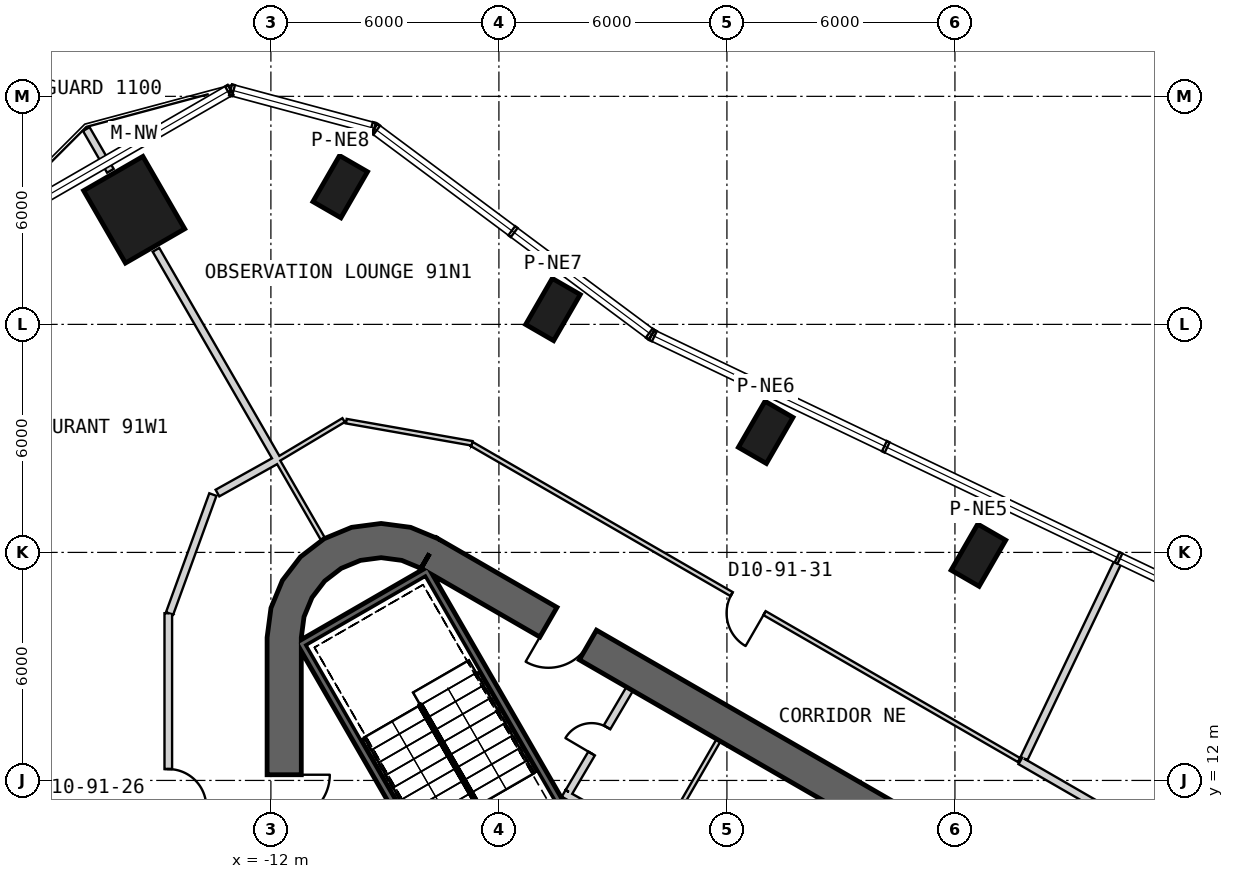
"""IFC4 building model, lengths in metres.
Left out: names, types, materials, properties, quantities, classifications, styles, units other than length and angle.
Written with IfcOpenShell. Run it as: python <this file> out.ifc"""

import sys

from ifc_helpers import new_model, si_unit, direction, frame, frame_2d, origin, origin_2d, place, context, subcontext, project, spatial, polyline, rectangle, outline, extrude, element, fill, save


model = new_model("IFC4")
c1 = context("Model", 3, precision=1e-05, world=origin(), true_north=direction((0.0, 1.0)))
c2 = subcontext(c1, "Body", "Model", "MODEL_VIEW")
j1 = project(units=[si_unit("LENGTHUNIT", "METRE"), si_unit("PLANEANGLEUNIT", "RADIAN")], contexts=[c1])
p1 = place(None, origin())
s1 = spatial("IfcSite", under=j1, at=p1, CompositionType="ELEMENT")
p2 = place(p1, origin())
s2 = spatial("IfcBuilding", under=s1, at=p2, CompositionType="ELEMENT")
p3 = place(p2, frame((0.0, 0.0, 398.3)))
s3 = spatial("IfcBuildingStorey", under=s2, at=p3, CompositionType="ELEMENT", Elevation=398.3)
p4 = place(p3, frame((-15.598, 27.016, 0.0), z_axis=(0.0, 0.0, 1.0), x_axis=(-0.5, 0.866025403784, 0.0)))
e1 = element("IfcColumn", 1, at=p4, inside=s3, PredefinedType="COLUMN", context=c2, shape_type="SweptSolid", body=[
    extrude(rectangle(XDim=2.2, YDim=1.8, at=origin_2d()), origin(), (0.0, 0.0, 1.0), 6.5),
])
for number, where, z_axis, x_axis in (
    (2, (6.618, 17.927, -0.3), (0.0, 0.0, 1.0), (0.5, 0.866, 0.0)),
    (3, (1.02, 21.159, -0.3), (0.0, 0.0, 1.0), (0.5, 0.866, 0.0)),
):
    element("IfcColumn", number, at=place(p3, frame(where, z_axis=z_axis, x_axis=x_axis)), inside=s3, PredefinedType="COLUMN", context=c2, shape_type="SweptSolid", body=[
        extrude(rectangle(XDim=1.4, YDim=0.85, at=origin_2d()), origin(), (0.0, 0.0, 1.0), 6.8),
    ])
for number, where, z_axis, x_axis in (
    (4, (-4.578, 24.391, 0.0), (0.0, 0.0, 1.0), (0.5, 0.866, 0.0)),
    (5, (-10.176, 27.623, 0.0), (0.0, 0.0, 1.0), (0.5, 0.866, 0.0)),
):
    element("IfcColumn", number, at=place(p3, frame(where, z_axis=z_axis, x_axis=x_axis)), inside=s3, PredefinedType="COLUMN", context=c2, shape_type="SweptSolid", body=[
        extrude(rectangle(XDim=1.4, YDim=0.85, at=origin_2d()), origin(), (0.0, 0.0, 1.0), 6.5),
    ])
p5 = place(p3, frame((19.475, 2.208, 0.0), z_axis=(0.0, 0.0, 1.0), x_axis=(-0.866028369851, 0.499994862586, 0.0)))
e6 = element("IfcWall", 6, at=p5, inside=s3, PredefinedType="SHEAR", context=c2, shape_type="SweptSolid", body=[
    extrude(rectangle(XDim=31.523, YDim=0.9, at=frame_2d((15.762, 0.0))), origin(), (0.0, 0.0, 1.0), 6.5),
])
p6 = place(p5, frame((3.612, 0.0, 0.0)))
e7 = element("IfcOpeningElement", 7, at=p6, cuts=e6, PredefinedType="OPENING", context=c2, shape_type="SweptSolid", body=[
    extrude(rectangle(XDim=1.2, YDim=2.4, at=frame_2d((0.6, 1.2))), frame((0.0, 0.46, 0.0), z_axis=(0.0, -1.0, 0.0), x_axis=(1.0, 0.0, 0.0)), (0.0, 0.0, 1.0), 0.92),
])
p7 = place(p5, frame((26.712, 0.0, 0.0)))
e8 = element("IfcOpeningElement", 8, at=p7, cuts=e6, PredefinedType="OPENING", context=c2, shape_type="SweptSolid", body=[
    extrude(rectangle(XDim=1.2, YDim=2.4, at=frame_2d((0.6, 1.2))), frame((0.0, 0.46, 0.0), z_axis=(0.0, -1.0, 0.0), x_axis=(1.0, 0.0, 0.0)), (0.0, 0.0, 1.0), 0.92),
])
p8 = place(p3, frame((-11.65, 15.762, 0.0), z_axis=(0.0, 0.0, 1.0), x_axis=(0.0, -1.0, 0.0)))
e9 = element("IfcWall", 9, at=p8, inside=s3, PredefinedType="SHEAR", context=c2, shape_type="SweptSolid", body=[
    extrude(rectangle(XDim=31.523, YDim=0.9, at=frame_2d((15.762, 0.0))), origin(), (0.0, 0.0, 1.0), 6.5),
])
p9 = place(p8, frame((3.612, 0.0, 0.0)))
e10 = element("IfcOpeningElement", 10, at=p9, cuts=e9, PredefinedType="OPENING", context=c2, shape_type="SweptSolid", body=[
    extrude(rectangle(XDim=1.2, YDim=2.4, at=frame_2d((0.6, 1.2))), frame((0.0, 0.46, 0.0), z_axis=(0.0, -1.0, 0.0), x_axis=(1.0, 0.0, 0.0)), (0.0, 0.0, 1.0), 0.92),
])
p10 = place(p8, frame((26.712, 0.0, 0.0)))
e11 = element("IfcOpeningElement", 11, at=p10, cuts=e9, PredefinedType="OPENING", context=c2, shape_type="SweptSolid", body=[
    extrude(rectangle(XDim=1.2, YDim=2.4, at=frame_2d((0.6, 1.2))), frame((0.0, 0.46, 0.0), z_axis=(0.0, -1.0, 0.0), x_axis=(1.0, 0.0, 0.0)), (0.0, 0.0, 1.0), 0.92),
])
p11 = place(p3, origin())
e12 = element("IfcWall", 12, at=p11, inside=s3, PredefinedType="SHEAR", context=c2, shape_type="SweptSolid", body=[
    extrude(outline(polyline([(-7.6, 18.36), (-8.323, 18.659), (-9.1, 18.762), (-9.876, 18.659), (-10.6, 18.36), (-11.221, 17.883), (-11.698, 17.262), (-11.998, 16.538), (-12.1, 15.762), (-11.2, 15.762), (-11.128, 16.305), (-10.919, 16.812), (-10.585, 17.247), (-10.15, 17.58), (-9.644, 17.79), (-9.1, 17.862), (-8.556, 17.79), (-8.05, 17.58), (-7.6, 18.36)])), origin(), (0.0, 0.0, 1.0), 6.5),
])
p12 = place(p3, frame((-11.245, 15.678, -0.3), z_axis=(0.0, 0.0, 1.0), x_axis=(0.499977274689, -0.866038523851, 0.0)))
e13 = element("IfcWall", 13, at=p12, inside=s3, PredefinedType="SHEAR", context=c2, shape_type="SweptSolid", body=[
    extrude(rectangle(XDim=8.1, YDim=0.2, at=frame_2d((4.05, 0.0))), origin(), (0.0, 0.0, 1.0), 6.5),
])
p13 = place(p3, frame((-7.818, 17.541, -0.3), z_axis=(0.0, 0.0, 1.0), x_axis=(-0.866044365799, -0.499967155389, 0.0)))
e14 = element("IfcWall", 14, at=p13, inside=s3, PredefinedType="SHEAR", context=c2, shape_type="SweptSolid", body=[
    extrude(rectangle(XDim=3.8, YDim=0.2, at=frame_2d((1.9, 0.0))), origin(), (0.0, 0.0, 1.0), 6.5),
])
p14 = place(p3, frame((-7.854, 17.405, -0.3), z_axis=(0.0, 0.0, 1.0), x_axis=(0.499997992926, -0.866026562566, 0.0)))
e15 = element("IfcWall", 15, at=p14, inside=s3, PredefinedType="SHEAR", context=c2, shape_type="SweptSolid", body=[
    extrude(rectangle(XDim=7.9, YDim=0.2, at=frame_2d((3.95, 0.0))), origin(), (0.0, 0.0, 1.0), 6.5),
])
p15 = place(p3, frame((-0.22, 13.06, 0.0), z_axis=(0.0, 0.0, 1.0), x_axis=(-0.499984717929, -0.866034226713, 0.0)))
e16 = element("IfcWall", 16, at=p15, inside=s3, PredefinedType="PARTITIONING", context=c2, shape_type="SweptSolid", body=[
    extrude(rectangle(XDim=3.25, YDim=0.12, at=frame_2d((1.625, 0.0))), origin(), (0.0, 0.0, 1.0), 6.2),
])
p16 = place(p3, frame((-4.296, 11.659, 0.0), z_axis=(0.0, 0.0, 1.0), x_axis=(0.871534483978, -0.490334215854, 0.0)))
e17 = element("IfcWall", 17, at=p16, inside=s3, PredefinedType="PARTITIONING", context=c2, shape_type="SweptSolid", body=[
    extrude(rectangle(XDim=2.7, YDim=0.2, at=frame_2d((1.35, 0.0))), origin(), (0.0, 0.0, 1.0), 6.2),
])
p17 = place(p3, frame((-2.558, 14.409, 0.0), z_axis=(0.0, 0.0, 1.0), x_axis=(-0.508018930956, -0.861345903683, 0.0)))
e18 = element("IfcWall", 18, at=p17, inside=s3, PredefinedType="PARTITIONING", context=c2, shape_type="SweptSolid", body=[
    extrude(rectangle(XDim=3.15, YDim=0.2, at=frame_2d((1.575, 0.0))), origin(), (0.0, 0.0, 1.0), 6.2),
])
p18 = place(p17, frame((1.175, 0.0, 0.0)))
e19 = element("IfcOpeningElement", 19, at=p18, cuts=e18, PredefinedType="OPENING", context=c2, shape_type="SweptSolid", body=[
    extrude(rectangle(XDim=0.8, YDim=2.1, at=frame_2d((0.4, 1.05))), frame((0.0, 0.11, 0.0), z_axis=(0.0, -1.0, 0.0), x_axis=(1.0, 0.0, 0.0)), (0.0, 0.0, 1.0), 0.22),
])
p19 = place(p3, frame((-14.7, 16.399, 0.0), z_axis=(0.0, 0.0, 1.0), x_axis=(0.0, -1.0, 0.0)))
e20 = element("IfcWall", 20, at=p19, inside=s3, PredefinedType="PARTITIONING", context=c2, shape_type="SweptSolid", body=[
    extrude(rectangle(XDim=9.078, YDim=0.2, at=frame_2d((4.539, 0.0))), origin(), (0.0, 0.0, 1.0), 5.57),
])
p20 = place(p19, frame((4.1, 0.0, 0.0)))
e21 = element("IfcOpeningElement", 21, at=p20, cuts=e20, PredefinedType="OPENING", context=c2, shape_type="SweptSolid", body=[
    extrude(rectangle(XDim=1.0, YDim=2.1, at=frame_2d((0.5, 1.05))), frame((0.0, 0.11, 0.0), z_axis=(0.0, -1.0, 0.0), x_axis=(1.0, 0.0, 0.0)), (0.0, 0.0, 1.0), 0.22),
])
p21 = place(p3, frame((-13.527, 19.522, 0.0), z_axis=(0.0, 0.0, 1.0), x_axis=(-0.341978542333, -0.939707761266, 0.0)))
e22 = element("IfcWall", 22, at=p21, inside=s3, PredefinedType="PARTITIONING", context=c2, shape_type="SweptSolid", body=[
    extrude(rectangle(XDim=3.33, YDim=0.2, at=frame_2d((1.665, 0.0))), origin(), (0.0, 0.0, 1.0), 5.57),
])
p22 = place(p3, frame((-11.808, 20.452, 0.0), z_axis=(0.0, 0.0, 1.0), x_axis=(-0.873514477635, -0.486798169021, 0.0)))
e23 = element("IfcWall", 23, at=p22, inside=s3, PredefinedType="PARTITIONING", context=c2, shape_type="SweptSolid", body=[
    extrude(rectangle(XDim=1.83, YDim=0.2, at=frame_2d((0.915, 0.0))), origin(), (0.0, 0.0, 1.0), 5.57),
])
p23 = place(p3, frame((-11.849, 20.463, 0.0), z_axis=(0.0, 0.0, 1.0), x_axis=(0.500047596559, -0.865997922154, 0.0)))
e24 = element("IfcWall", 24, at=p23, inside=s3, PredefinedType="PARTITIONING", context=c2, shape_type="SweptSolid", body=[
    extrude(rectangle(XDim=2.6, YDim=0.12, at=frame_2d((1.3, 0.0))), origin(), (0.0, 0.0, 1.0), 5.57),
])
p24 = place(p3, frame((-16.858, 29.138, 0.0), z_axis=(0.0, 0.0, 1.0), x_axis=(0.499950289094, -0.866054102487, 0.0)))
e25 = element("IfcWall", 25, at=p24, inside=s3, PredefinedType="PARTITIONING", context=c2, shape_type="SweptSolid", body=[
    extrude(rectangle(XDim=1.268, YDim=0.2, at=frame_2d((0.634, 0.0))), origin(), (0.0, 0.0, 1.0), 6.2),
])
p25 = place(p3, frame((-15.024, 25.962, 0.0), z_axis=(0.0, 0.0, 1.0), x_axis=(0.499993152284, -0.866029357279, 0.0)))
e26 = element("IfcWall", 26, at=p25, inside=s3, PredefinedType="PARTITIONING", context=c2, shape_type="SweptSolid", body=[
    extrude(rectangle(XDim=6.35, YDim=0.2, at=frame_2d((3.175, 0.0))), origin(), (0.0, 0.0, 1.0), 5.57),
])
p26 = place(p3, frame((21.552, 4.531, 0.0), z_axis=(0.0, 0.0, 1.0), x_axis=(-0.86602469383, 0.500001229675, 0.0)))
e27 = element("IfcWall", 27, at=p26, inside=s3, PredefinedType="PARTITIONING", context=c2, shape_type="SweptSolid", body=[
    extrude(rectangle(XDim=15.97, YDim=0.2, at=frame_2d((7.985, 0.0))), origin(), (0.0, 0.0, 1.0), 5.57),
])
p27 = place(p26, frame((7.5, 0.0, 0.0)))
e28 = element("IfcOpeningElement", 28, at=p27, cuts=e27, PredefinedType="OPENING", context=c2, shape_type="SweptSolid", body=[
    extrude(rectangle(XDim=1.0, YDim=2.1, at=frame_2d((0.5, 1.05))), frame((0.0, 0.11, 0.0), z_axis=(0.0, -1.0, 0.0), x_axis=(1.0, 0.0, 0.0)), (0.0, 0.0, 1.0), 0.22),
])
p28 = place(p3, frame((-10.087, 21.481, 0.0), z_axis=(0.0, 0.0, 1.0), x_axis=(-0.858372726575, -0.513026570728, 0.0)))
e29 = element("IfcWall", 29, at=p28, inside=s3, PredefinedType="PARTITIONING", context=c2, shape_type="SweptSolid", body=[
    extrude(rectangle(XDim=2.005, YDim=0.12, at=frame_2d((1.002, 0.0))), origin(), (0.0, 0.0, 1.0), 5.57),
])
p29 = place(p3, frame((-6.707, 20.87, 0.0), z_axis=(0.0, 0.0, 1.0), x_axis=(-0.984811337603, 0.173627847217, 0.0)))
e30 = element("IfcWall", 30, at=p29, inside=s3, PredefinedType="PARTITIONING", context=c2, shape_type="SweptSolid", body=[
    extrude(rectangle(XDim=3.361, YDim=0.12, at=frame_2d((1.68, 0.0))), origin(), (0.0, 0.0, 1.0), 5.57),
])
p30 = place(p3, frame((7.687, 12.536, 0.0), z_axis=(0.0, 0.0, 1.0), x_axis=(-0.866029110027, 0.499993580544, 0.0)))
e31 = element("IfcWall", 31, at=p30, inside=s3, PredefinedType="PARTITIONING", context=c2, shape_type="SweptSolid", body=[
    extrude(rectangle(XDim=16.629, YDim=0.12, at=frame_2d((8.314, 0.0))), origin(), (0.0, 0.0, 1.0), 5.57),
])
p31 = place(p30, frame((7.732, 0.0, 0.0)))
e32 = element("IfcOpeningElement", 32, at=p31, cuts=e31, PredefinedType="OPENING", context=c2, shape_type="SweptSolid", body=[
    extrude(rectangle(XDim=1.0, YDim=2.1, at=frame_2d((0.5, 1.05))), frame((0.0, 0.07, 0.0), z_axis=(0.0, -1.0, 0.0), x_axis=(1.0, 0.0, 0.0)), (0.0, 0.0, 1.0), 0.14),
])
p32 = place(p3, frame((7.817, 12.576, 0.0), z_axis=(0.0, 0.0, 1.0), x_axis=(0.43107042423, 0.902318286058, 0.0)))
e33 = element("IfcWall", 33, at=p32, inside=s3, PredefinedType="PARTITIONING", context=c2, shape_type="SweptSolid", body=[
    extrude(rectangle(XDim=5.833, YDim=0.2, at=frame_2d((2.917, 0.0))), origin(), (0.0, 0.0, 1.0), 6.2),
])
p33 = place(p18, origin())
e34 = element("IfcDoor", 34, at=p33, inside=s3, OperationType="SINGLE_SWING_RIGHT", PredefinedType="USERDEFINED", context=c2, shape_type="SweptSolid", body=[
    extrude(rectangle(XDim=0.8, YDim=2.1, at=frame_2d((0.4, 1.05))), frame((0.0, 0.025, 0.0), z_axis=(0.0, -1.0, 0.0), x_axis=(1.0, 0.0, 0.0)), (0.0, 0.0, 1.0), 0.05),
])
fill(e19, e34)
p34 = place(p20, origin())
e35 = element("IfcDoor", 35, at=p34, inside=s3, OperationType="SINGLE_SWING_RIGHT", PredefinedType="USERDEFINED", context=c2, shape_type="SweptSolid", body=[
    extrude(rectangle(XDim=1.0, YDim=2.1, at=frame_2d((0.5, 1.05))), frame((0.0, 0.025, 0.0), z_axis=(0.0, -1.0, 0.0), x_axis=(1.0, 0.0, 0.0)), (0.0, 0.0, 1.0), 0.05),
])
fill(e21, e35)
p35 = place(p31, origin())
e36 = element("IfcDoor", 36, at=p35, inside=s3, OperationType="SINGLE_SWING_LEFT", PredefinedType="NOTDEFINED", context=c2, shape_type="SweptSolid", body=[
    extrude(rectangle(XDim=1.0, YDim=2.1, at=frame_2d((0.5, 1.05))), frame((0.0, 0.025, 0.0), z_axis=(0.0, -1.0, 0.0), x_axis=(1.0, 0.0, 0.0)), (0.0, 0.0, 1.0), 0.05),
])
fill(e32, e36)
p36 = place(p7, origin())
e37 = element("IfcDoor", 37, at=p36, inside=s3, OperationType="SINGLE_SWING_RIGHT", PredefinedType="USERDEFINED", context=c2, shape_type="SweptSolid", body=[
    extrude(rectangle(XDim=1.2, YDim=2.4, at=frame_2d((0.6, 1.2))), frame((0.0, 0.025, 0.0), z_axis=(0.0, -1.0, 0.0), x_axis=(1.0, 0.0, 0.0)), (0.0, 0.0, 1.0), 0.05),
])
fill(e8, e37)
p37 = place(p9, origin())
e38 = element("IfcDoor", 38, at=p37, inside=s3, OperationType="SINGLE_SWING_LEFT", PredefinedType="USERDEFINED", context=c2, shape_type="SweptSolid", body=[
    extrude(rectangle(XDim=1.2, YDim=2.4, at=frame_2d((0.6, 1.2))), frame((0.0, 0.025, 0.0), z_axis=(0.0, -1.0, 0.0), x_axis=(1.0, 0.0, 0.0)), (0.0, 0.0, 1.0), 0.05),
])
fill(e10, e38)
save(model, sys.argv[1])
